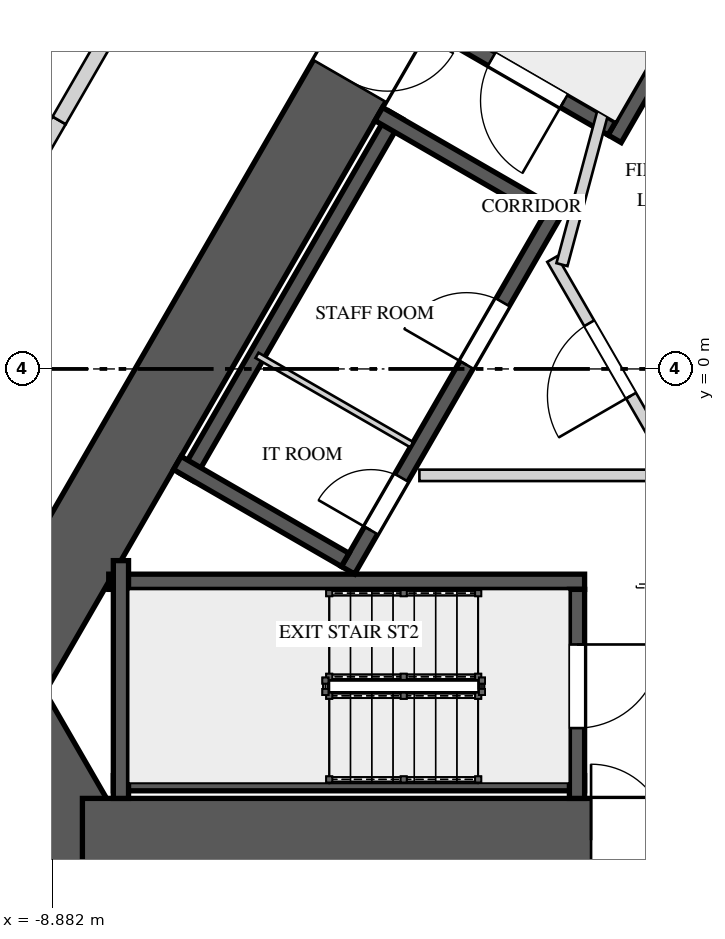
"""IFC4 building model, lengths in metres.
Left out: names, types, materials, properties, quantities, classifications, styles, units other than length and angle.
Written with IfcOpenShell. Run it as: python <this file> out.ifc"""

import sys

from ifc_helpers import new_model, si_unit, direction, frame, frame_2d, origin, place, context, subcontext, project, spatial, rectangle, extrude, element, fill, save


model = new_model("IFC4")
c1 = context("Model", 3, precision=1e-05, world=origin(), true_north=direction((0.0, 1.0)))
c2 = subcontext(c1, "Body", "Model", "MODEL_VIEW")
j1 = project(units=[si_unit("LENGTHUNIT", "METRE"), si_unit("PLANEANGLEUNIT", "RADIAN")], contexts=[c1])
p1 = place(None, origin())
s1 = spatial("IfcSite", under=j1, at=p1, CompositionType="ELEMENT")
p2 = place(p1, origin())
s2 = spatial("IfcBuilding", under=s1, at=p2, CompositionType="ELEMENT")
p3 = place(p2, frame((0.0, 0.0, 25.0)))
s3 = spatial("IfcBuildingStorey", under=s2, at=p3, CompositionType="ELEMENT", Elevation=25.0)
p4 = place(p3, frame((-1.126, 10.45, 0.0), z_axis=(0.0, 0.0, 1.0), x_axis=(-0.500001757713, -0.866024388966, 0.0)))
e1 = element("IfcWall", 1, at=p4, inside=s3, PredefinedType="SHEAR", context=c2, shape_type="SweptSolid", body=[
    extrude(rectangle(XDim=16.974, YDim=1.1, at=frame_2d((8.487, 0.0))), origin(), (0.0, 0.0, 1.0), 5.0),
])
p5 = place(p4, frame((6.692, 0.0, 0.0)))
e2 = element("IfcOpeningElement", 2, at=p5, cuts=e1, PredefinedType="OPENING", context=c2, shape_type="SweptSolid", body=[
    extrude(rectangle(XDim=1.0, YDim=2.4, at=frame_2d((0.5, 1.2))), frame((0.0, 0.56, 0.0), z_axis=(0.0, -1.0, 0.0), x_axis=(1.0, 0.0, 0.0)), (0.0, 0.0, 1.0), 1.12),
])
p6 = place(p3, frame((-9.772, -3.975, 0.0), z_axis=(0.0, 0.0, 1.0), x_axis=(0.499995765644, -0.866027848477, 0.0)))
e3 = element("IfcWall", 3, at=p6, inside=s3, PredefinedType="SHEAR", context=c2, shape_type="SweptSolid", body=[
    extrude(rectangle(XDim=2.887, YDim=1.1, at=frame_2d((1.443, 0.0))), origin(), (0.0, 0.0, 1.0), 5.0),
])
p7 = place(p3, frame((-8.487, -6.2, 0.0), z_axis=(0.0, 0.0, 1.0), x_axis=(1.0, 0.0, 0.0)))
e4 = element("IfcWall", 4, at=p7, inside=s3, PredefinedType="SHEAR", context=c2, shape_type="SweptSolid", body=[
    extrude(rectangle(XDim=16.974, YDim=1.1, at=frame_2d((8.487, 0.0))), origin(), (0.0, 0.0, 1.0), 5.0),
])
p8 = place(p7, frame((6.692, 0.0, 0.0)))
e5 = element("IfcOpeningElement", 5, at=p8, cuts=e4, PredefinedType="OPENING", context=c2, shape_type="SweptSolid", body=[
    extrude(rectangle(XDim=1.0, YDim=2.4, at=frame_2d((0.5, 1.2))), frame((0.0, 0.56, 0.0), z_axis=(0.0, -1.0, 0.0), x_axis=(1.0, 0.0, 0.0)), (0.0, 0.0, 1.0), 1.12),
])
p9 = place(p7, frame((14.397, 0.0, 0.0)))
e6 = element("IfcOpeningElement", 6, at=p9, cuts=e4, PredefinedType="OPENING", context=c2, shape_type="SweptSolid", body=[
    extrude(rectangle(XDim=0.8, YDim=2.1, at=frame_2d((0.4, 1.05))), frame((0.0, 0.56, 0.0), z_axis=(0.0, -1.0, 0.0), x_axis=(1.0, 0.0, 0.0)), (0.0, 0.0, 1.0), 1.12),
])
p10 = place(p3, frame((1.646, 8.45, 0.0), z_axis=(0.0, 0.0, 1.0), x_axis=(-0.500006002103, -0.866021938441, 0.0)))
e7 = element("IfcWall", 7, at=p10, inside=s3, PredefinedType="SOLIDWALL", context=c2, shape_type="SweptSolid", body=[
    extrude(rectangle(XDim=6.261, YDim=0.2, at=frame_2d((3.13, 0.0))), origin(), (0.0, 0.0, 1.0), 4.65),
])
p11 = place(p3, frame((-1.521, 3.165, 0.0), z_axis=(0.0, 0.0, 1.0), x_axis=(-0.866027397988, 0.499996545922, 0.0)))
e8 = element("IfcWall", 8, at=p11, inside=s3, PredefinedType="SOLIDWALL", context=c2, shape_type="SweptSolid", body=[
    extrude(rectangle(XDim=2.75, YDim=0.2, at=frame_2d((1.375, 0.0))), origin(), (0.0, 0.0, 1.0), 4.65),
])
p12 = place(p11, frame((0.725, 0.0, 0.0)))
e9 = element("IfcOpeningElement", 9, at=p12, cuts=e8, PredefinedType="OPENING", context=c2, shape_type="SweptSolid", body=[
    extrude(rectangle(XDim=1.1, YDim=2.4, at=frame_2d((0.55, 1.2))), frame((0.0, 0.11, 0.0), z_axis=(0.0, -1.0, 0.0), x_axis=(1.0, 0.0, 0.0)), (0.0, 0.0, 1.0), 0.22),
])
p13 = place(p3, frame((-8.08, -5.45, 0.0), z_axis=(0.0, 0.0, 1.0), x_axis=(1.0, 0.0, 0.0)))
e10 = element("IfcWall", 10, at=p13, inside=s3, PredefinedType="SOLIDWALL", context=c2, shape_type="SweptSolid", body=[
    extrude(rectangle(XDim=6.2, YDim=0.2, at=frame_2d((3.1, 0.0))), origin(), (0.0, 0.0, 1.0), 4.65),
])
p14 = place(p3, frame((-8.141, -2.8, 0.0), z_axis=(0.0, 0.0, 1.0), x_axis=(1.0, 0.0, 0.0)))
e11 = element("IfcWall", 11, at=p14, inside=s3, PredefinedType="SOLIDWALL", context=c2, shape_type="SweptSolid", body=[
    extrude(rectangle(XDim=6.261, YDim=0.2, at=frame_2d((3.13, 0.0))), origin(), (0.0, 0.0, 1.0), 4.65),
])
p15 = place(p3, frame((-7.98, -2.522, 0.0), z_axis=(0.0, 0.0, 1.0), x_axis=(0.0, -1.0, 0.0)))
e12 = element("IfcWall", 12, at=p15, inside=s3, PredefinedType="SOLIDWALL", context=c2, shape_type="SweptSolid", body=[
    extrude(rectangle(XDim=3.128, YDim=0.2, at=frame_2d((1.564, 0.0))), origin(), (0.0, 0.0, 1.0), 4.65),
])
p16 = place(p3, frame((-1.98, -2.9, 0.0), z_axis=(0.0, 0.0, 1.0), x_axis=(0.0, -1.0, 0.0)))
e13 = element("IfcWall", 13, at=p16, inside=s3, PredefinedType="SOLIDWALL", context=c2, shape_type="SweptSolid", body=[
    extrude(rectangle(XDim=2.75, YDim=0.2, at=frame_2d((1.375, 0.0))), origin(), (0.0, 0.0, 1.0), 4.65),
])
p17 = place(p16, frame((0.725, 0.0, 0.0)))
e14 = element("IfcOpeningElement", 14, at=p17, cuts=e13, PredefinedType="OPENING", context=c2, shape_type="SweptSolid", body=[
    extrude(rectangle(XDim=1.1, YDim=2.4, at=frame_2d((0.55, 1.2))), frame((0.0, 0.11, 0.0), z_axis=(0.0, -1.0, 0.0), x_axis=(1.0, 0.0, 0.0)), (0.0, 0.0, 1.0), 0.22),
])
p18 = place(p3, frame((-4.993, -2.648, 0.0), z_axis=(0.0, 0.0, 1.0), x_axis=(0.499996545922, 0.866027397988, 0.0)))
e15 = element("IfcWall", 15, at=p18, inside=s3, PredefinedType="SOLIDWALL", context=c2, shape_type="SweptSolid", body=[
    extrude(rectangle(XDim=5.5, YDim=0.2, at=frame_2d((2.75, 0.0))), origin(), (0.0, 0.0, 1.0), 4.65),
])
p19 = place(p18, frame((3.12, 0.0, 0.0)))
e16 = element("IfcOpeningElement", 16, at=p19, cuts=e15, PredefinedType="OPENING", context=c2, shape_type="SweptSolid", body=[
    extrude(rectangle(XDim=0.95, YDim=2.4, at=frame_2d((0.475, 1.2))), frame((0.0, 0.11, 0.0), z_axis=(0.0, -1.0, 0.0), x_axis=(1.0, 0.0, 0.0)), (0.0, 0.0, 1.0), 0.22),
])
p20 = place(p18, frame((0.605, 0.0, 0.0)))
e17 = element("IfcOpeningElement", 17, at=p20, cuts=e15, PredefinedType="OPENING", context=c2, shape_type="SweptSolid", body=[
    extrude(rectangle(XDim=0.8, YDim=2.1, at=frame_2d((0.4, 1.05))), frame((0.0, 0.11, 0.0), z_axis=(0.0, -1.0, 0.0), x_axis=(1.0, 0.0, 0.0)), (0.0, 0.0, 1.0), 0.22),
])
p21 = place(p3, frame((-4.365, 3.34, 0.0), z_axis=(0.0, 0.0, 1.0), x_axis=(-0.499996545922, -0.866027397988, 0.0)))
e18 = element("IfcWall", 18, at=p21, inside=s3, PredefinedType="SOLIDWALL", context=c2, shape_type="SweptSolid", body=[
    extrude(rectangle(XDim=5.5, YDim=0.2, at=frame_2d((2.75, 0.0))), origin(), (0.0, 0.0, 1.0), 4.65),
])
for number, where, z_axis, x_axis in (
    (19, (-2.38, 2.078, 0.0), (0.0, 0.0, 1.0), (-0.866, 0.5, 0.0)),
    (20, (-5.03, -2.512, 0.0), (0.0, 0.0, 1.0), (-0.866, 0.5, 0.0)),
):
    element("IfcWall", number, at=place(p3, frame(where, z_axis=z_axis, x_axis=x_axis)), inside=s3, PredefinedType="SOLIDWALL", context=c2, shape_type="SweptSolid", body=[
        extrude(rectangle(XDim=2.55, YDim=0.2, at=frame_2d((1.275, 0.0))), origin(), (0.0, 0.0, 1.0), 4.65),
    ])
p22 = place(p3, frame((-4.155, -0.996, 0.0), z_axis=(0.0, 0.0, 1.0), x_axis=(-0.866016039709, 0.500016218704, 0.0)))
e21 = element("IfcWall", 21, at=p22, inside=s3, PredefinedType="PARTITIONING", context=c2, shape_type="SweptSolid", body=[
    extrude(rectangle(XDim=2.35, YDim=0.08, at=frame_2d((1.175, 0.0))), origin(), (0.0, 0.0, 1.0), 4.65),
])
p23 = place(p3, frame((-0.744, -1.261, 0.0), z_axis=(0.0, 0.0, 1.0), x_axis=(-0.500004234368, 0.866022959057, 0.0)))
e22 = element("IfcWall", 22, at=p23, inside=s3, PredefinedType="PARTITIONING", context=c2, shape_type="SweptSolid", body=[
    extrude(rectangle(XDim=3.125, YDim=0.15, at=frame_2d((1.562, 0.0))), origin(), (0.0, 0.0, 1.0), 4.65),
])
p24 = place(p23, frame((1.05, 0.0, 0.0)))
e23 = element("IfcOpeningElement", 23, at=p24, cuts=e22, PredefinedType="OPENING", context=c2, shape_type="SweptSolid", body=[
    extrude(rectangle(XDim=1.1, YDim=2.4, at=frame_2d((0.55, 1.2))), frame((0.0, 0.085, 0.0), z_axis=(0.0, -1.0, 0.0), x_axis=(1.0, 0.0, 0.0)), (0.0, 0.0, 1.0), 0.17),
])
p25 = place(p3, frame((-2.178, 1.372, 0.0), z_axis=(0.0, 0.0, 1.0), x_axis=(0.258808958833, 0.96592852884, 0.0)))
e24 = element("IfcWall", 24, at=p25, inside=s3, PredefinedType="PARTITIONING", context=c2, shape_type="SweptSolid", body=[
    extrude(rectangle(XDim=2.903, YDim=0.15, at=frame_2d((1.451, 0.0))), origin(), (0.0, 0.0, 1.0), 4.65),
])
p26 = place(p3, frame((-1.51, 4.215, 0.0), z_axis=(0.0, 0.0, 1.0), x_axis=(0.866085525409, 0.49989585183, 0.0)))
e25 = element("IfcWall", 25, at=p26, inside=s3, PredefinedType="PARTITIONING", context=c2, shape_type="SweptSolid", body=[
    extrude(rectangle(XDim=1.3, YDim=0.15, at=frame_2d((0.65, 0.0))), origin(), (0.0, 0.0, 1.0), 4.65),
])
p27 = place(p3, frame((-4.053, -1.4, 0.0), z_axis=(0.0, 0.0, 1.0), x_axis=(1.0, 0.0, 0.0)))
e26 = element("IfcWall", 26, at=p27, inside=s3, PredefinedType="PARTITIONING", context=c2, shape_type="SweptSolid", body=[
    extrude(rectangle(XDim=7.876, YDim=0.15, at=frame_2d((3.938, 0.0))), origin(), (0.0, 0.0, 1.0), 4.65),
])
p28 = place(p3, frame((-9.202, 2.561, 0.0), z_axis=(0.0, 0.0, 1.0), x_axis=(0.500118501653, 0.865956976012, 0.0)))
e27 = element("IfcWall", 27, at=p28, inside=s3, PredefinedType="SOLIDWALL", context=c2, shape_type="SweptSolid", body=[
    extrude(rectangle(XDim=0.818, YDim=0.2, at=frame_2d((0.409, 0.0))), origin(), (0.0, 0.0, 1.0), 3.75),
])
p29 = place(p3, frame((-8.793, 3.27, 0.0), z_axis=(0.0, 0.0, 1.0), x_axis=(0.499909024581, 0.866077922096, 0.0)))
e28 = element("IfcWall", 28, at=p29, inside=s3, PredefinedType="SOLIDWALL", context=c2, shape_type="SweptSolid", body=[
    extrude(rectangle(XDim=2.152, YDim=0.2, at=frame_2d((1.076, 0.0))), origin(), (0.0, 0.0, 1.0), 4.65),
])
p30 = place(p12, origin())
e29 = element("IfcDoor", 29, at=p30, inside=s3, OperationType="SINGLE_SWING_RIGHT", PredefinedType="DOOR", context=c2, shape_type="SweptSolid", body=[
    extrude(rectangle(XDim=1.1, YDim=2.4, at=frame_2d((0.55, 1.2))), frame((0.0, 0.025, 0.0), z_axis=(0.0, -1.0, 0.0), x_axis=(1.0, 0.0, 0.0)), (0.0, 0.0, 1.0), 0.05),
])
fill(e9, e29)
p31 = place(p17, origin())
e30 = element("IfcDoor", 30, at=p31, inside=s3, OperationType="SINGLE_SWING_LEFT", PredefinedType="DOOR", context=c2, shape_type="SweptSolid", body=[
    extrude(rectangle(XDim=1.1, YDim=2.4, at=frame_2d((0.55, 1.2))), frame((0.0, 0.025, 0.0), z_axis=(0.0, -1.0, 0.0), x_axis=(1.0, 0.0, 0.0)), (0.0, 0.0, 1.0), 0.05),
])
fill(e14, e30)
p32 = place(p19, origin())
e31 = element("IfcDoor", 31, at=p32, inside=s3, OperationType="SINGLE_SWING_LEFT", PredefinedType="DOOR", context=c2, shape_type="SweptSolid", body=[
    extrude(rectangle(XDim=0.95, YDim=2.4, at=frame_2d((0.475, 1.2))), frame((0.0, 0.025, 0.0), z_axis=(0.0, -1.0, 0.0), x_axis=(1.0, 0.0, 0.0)), (0.0, 0.0, 1.0), 0.05),
])
fill(e16, e31)
p33 = place(p20, origin())
e32 = element("IfcDoor", 32, at=p33, inside=s3, OperationType="SINGLE_SWING_RIGHT", PredefinedType="DOOR", context=c2, shape_type="SweptSolid", body=[
    extrude(rectangle(XDim=0.8, YDim=2.1, at=frame_2d((0.4, 1.05))), frame((0.0, 0.025, 0.0), z_axis=(0.0, -1.0, 0.0), x_axis=(1.0, 0.0, 0.0)), (0.0, 0.0, 1.0), 0.05),
])
fill(e17, e32)
p34 = place(p24, origin())
e33 = element("IfcDoor", 33, at=p34, inside=s3, OperationType="SINGLE_SWING_LEFT", PredefinedType="DOOR", context=c2, shape_type="SweptSolid", body=[
    extrude(rectangle(XDim=1.1, YDim=2.4, at=frame_2d((0.55, 1.2))), frame((0.0, 0.025, 0.0), z_axis=(0.0, -1.0, 0.0), x_axis=(1.0, 0.0, 0.0)), (0.0, 0.0, 1.0), 0.05),
])
fill(e23, e33)
p35 = place(p5, origin())
e34 = element("IfcDoor", 34, at=p35, inside=s3, OperationType="SINGLE_SWING_RIGHT", PredefinedType="DOOR", context=c2, shape_type="SweptSolid", body=[
    extrude(rectangle(XDim=1.0, YDim=2.4, at=frame_2d((0.5, 1.2))), frame((0.0, 0.025, 0.0), z_axis=(0.0, -1.0, 0.0), x_axis=(1.0, 0.0, 0.0)), (0.0, 0.0, 1.0), 0.05),
])
fill(e2, e34)
p36 = place(p8, origin())
e35 = element("IfcDoor", 35, at=p36, inside=s3, OperationType="SINGLE_SWING_LEFT", PredefinedType="DOOR", context=c2, shape_type="SweptSolid", body=[
    extrude(rectangle(XDim=1.0, YDim=2.4, at=frame_2d((0.5, 1.2))), frame((0.0, 0.025, 0.0), z_axis=(0.0, -1.0, 0.0), x_axis=(1.0, 0.0, 0.0)), (0.0, 0.0, 1.0), 0.05),
])
fill(e5, e35)
save(model, sys.argv[1])
